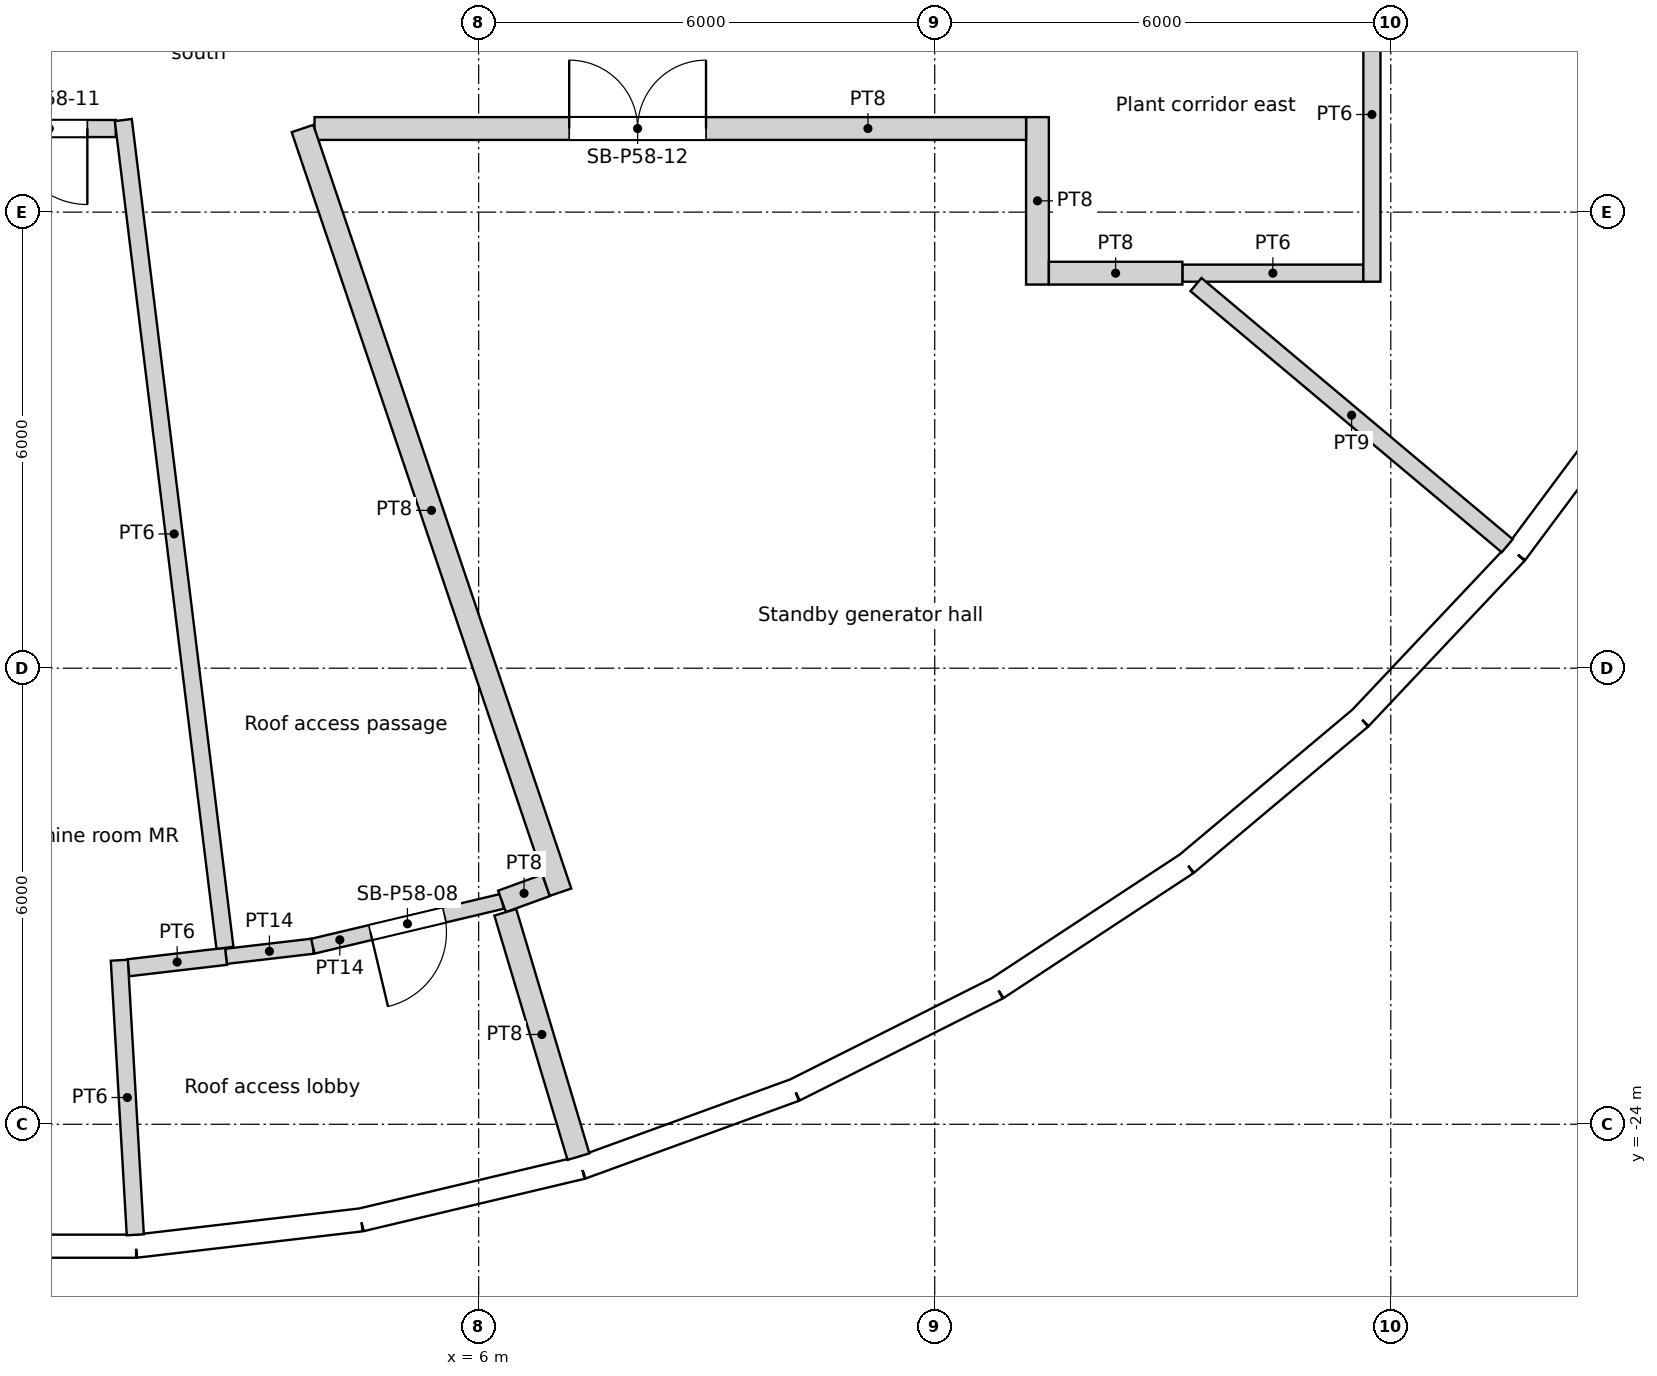
"""IFC4 building model, lengths in metres.
Left out: names, types, materials, properties, quantities, classifications, styles, units other than length and angle.
Written with IfcOpenShell. Run it as: python <this file> out.ifc"""

import sys

from ifc_helpers import new_model, si_unit, direction, frame, frame_2d, origin, origin_2d, place, context, subcontext, project, spatial, rectangle, circle, extrude, element, fill, save


model = new_model("IFC4")
c1 = context("Model", 3, precision=1e-05, world=origin(), true_north=direction((0.0, 1.0)))
c2 = subcontext(c1, "Body", "Model", "MODEL_VIEW")
j1 = project(units=[si_unit("LENGTHUNIT", "METRE"), si_unit("PLANEANGLEUNIT", "RADIAN")], contexts=[c1])
p1 = place(None, origin())
s1 = spatial("IfcSite", under=j1, at=p1, CompositionType="ELEMENT")
p2 = place(p1, origin())
s2 = spatial("IfcBuilding", under=s1, at=p2, CompositionType="ELEMENT")
p3 = place(p2, frame((0.0, 0.0, 225.0)))
s3 = spatial("IfcBuildingStorey", under=s2, at=p3, CompositionType="ELEMENT", Elevation=225.0)
for number, where, z_axis, x_axis in (
    (1, (4.263, -24.175, 0.0), (0.0, 0.0, 1.0), (1.0, 0.0, 0.0)),
    (2, (9.723, -22.54, 0.0), (0.0, 0.0, 1.0), (1.0, 0.0, 0.0)),
    (3, (14.659, -19.69, 0.0), (0.0, 0.0, 1.0), (1.0, 0.0, 0.0)),
    (4, (18.805, -15.779, 0.0), (0.0, 0.0, 1.0), (1.0, 0.0, 0.0)),
):
    element("IfcColumn", number, at=place(p3, frame(where, z_axis=z_axis, x_axis=x_axis)), inside=s3, PredefinedType="COLUMN", context=c2, shape_type="SweptSolid", body=[
        extrude(circle(Radius=0.6, at=origin_2d()), origin(), (0.0, 0.0, 1.0), 6.0),
    ])
for number, where, z_axis, x_axis in (
    (5, (1.406, -18.77, 0.0), (0.0, 0.0, 1.0), (1.0, 0.0, 0.0)),
    (6, (6.876, -17.521, 0.0), (0.0, 0.0, 1.0), (1.0, 0.0, 0.0)),
    (7, (11.735, -14.716, 0.0), (0.0, 0.0, 1.0), (1.0, 0.0, 0.0)),
    (8, (15.552, -10.603, 0.0), (0.0, 0.0, 1.0), (1.0, 0.0, 0.0)),
):
    element("IfcColumn", number, at=place(p3, frame(where, z_axis=z_axis, x_axis=x_axis)), inside=s3, PredefinedType="COLUMN", context=c2, shape_type="SweptSolid", body=[
        extrude(circle(Radius=0.65, at=origin_2d()), origin(), (0.0, 0.0, 1.0), 6.0),
    ])
p4 = place(p3, frame((-1.491, -25.604, 0.0), z_axis=(0.0, 0.0, 1.0), x_axis=(1.0, 0.0, 0.0)))
e9 = element("IfcWall", 9, at=p4, inside=s3, PredefinedType="SOLIDWALL", context=c2, shape_type="SweptSolid", body=[
    extrude(rectangle(XDim=2.982, YDim=0.3, at=frame_2d((1.491, 0.0))), origin(), (0.0, 0.0, 1.0), 5.65),
])
p5 = place(p4, frame((1.491, 0.0, 1.825)))
e10 = element("IfcOpeningElement", 10, at=p5, cuts=e9, PredefinedType="OPENING", context=c2, shape_type="SweptSolid", body=[
    extrude(circle(Radius=1.2, at=origin_2d()), frame((0.0, 0.16, 0.0), z_axis=(0.0, -1.0, 0.0), x_axis=(1.0, 0.0, 0.0)), (0.0, 0.0, 1.0), 0.32),
])
p6 = place(p3, frame((1.491, -25.604, 0.0), z_axis=(0.0, 0.0, 1.0), x_axis=(0.993240822844, 0.116071821888, 0.0)))
e11 = element("IfcWall", 11, at=p6, inside=s3, PredefinedType="SOLIDWALL", context=c2, shape_type="SweptSolid", body=[
    extrude(rectangle(XDim=2.983, YDim=0.3, at=frame_2d((1.491, 0.0))), origin(), (0.0, 0.0, 1.0), 5.65),
])
p7 = place(p6, frame((1.491, 0.0, 1.825)))
e12 = element("IfcOpeningElement", 12, at=p7, cuts=e11, PredefinedType="OPENING", context=c2, shape_type="SweptSolid", body=[
    extrude(circle(Radius=1.2, at=origin_2d()), frame((0.0, 0.16, 0.0), z_axis=(0.0, -1.0, 0.0), x_axis=(1.0, 0.0, 0.0)), (0.0, 0.0, 1.0), 0.32),
])
p8 = place(p3, frame((4.454, -25.258, 0.0), z_axis=(0.0, 0.0, 1.0), x_axis=(0.973049843813, 0.230594886012, 0.0)))
e13 = element("IfcWall", 13, at=p8, inside=s3, PredefinedType="SOLIDWALL", context=c2, shape_type="SweptSolid", body=[
    extrude(rectangle(XDim=2.982, YDim=0.3, at=frame_2d((1.491, 0.0))), origin(), (0.0, 0.0, 1.0), 5.65),
])
p9 = place(p8, frame((1.491, 0.0, 1.825)))
e14 = element("IfcOpeningElement", 14, at=p9, cuts=e13, PredefinedType="OPENING", context=c2, shape_type="SweptSolid", body=[
    extrude(circle(Radius=1.2, at=origin_2d()), frame((0.0, 0.16, 0.0), z_axis=(0.0, -1.0, 0.0), x_axis=(1.0, 0.0, 0.0)), (0.0, 0.0, 1.0), 0.32),
])
p10 = place(p3, frame((7.356, -24.57, 0.0), z_axis=(0.0, 0.0, 1.0), x_axis=(0.939676264274, 0.342065079129, 0.0)))
e15 = element("IfcWall", 15, at=p10, inside=s3, PredefinedType="SOLIDWALL", context=c2, shape_type="SweptSolid", body=[
    extrude(rectangle(XDim=2.983, YDim=0.3, at=frame_2d((1.491, 0.0))), origin(), (0.0, 0.0, 1.0), 5.65),
])
p11 = place(p10, frame((1.491, 0.0, 1.825)))
e16 = element("IfcOpeningElement", 16, at=p11, cuts=e15, PredefinedType="OPENING", context=c2, shape_type="SweptSolid", body=[
    extrude(circle(Radius=1.2, at=origin_2d()), frame((0.0, 0.16, 0.0), z_axis=(0.0, -1.0, 0.0), x_axis=(1.0, 0.0, 0.0)), (0.0, 0.0, 1.0), 0.32),
])
p12 = place(p3, frame((10.158, -23.55, 0.0), z_axis=(0.0, 0.0, 1.0), x_axis=(0.893656390984, 0.448751885626, 0.0)))
e17 = element("IfcWall", 17, at=p12, inside=s3, PredefinedType="SOLIDWALL", context=c2, shape_type="SweptSolid", body=[
    extrude(rectangle(XDim=2.982, YDim=0.3, at=frame_2d((1.491, 0.0))), origin(), (0.0, 0.0, 1.0), 5.65),
])
p13 = place(p12, frame((1.491, 0.0, 1.825)))
e18 = element("IfcOpeningElement", 18, at=p13, cuts=e17, PredefinedType="OPENING", context=c2, shape_type="SweptSolid", body=[
    extrude(circle(Radius=1.2, at=origin_2d()), frame((0.0, 0.16, 0.0), z_axis=(0.0, -1.0, 0.0), x_axis=(1.0, 0.0, 0.0)), (0.0, 0.0, 1.0), 0.32),
])
p14 = place(p3, frame((12.824, -22.211, 0.0), z_axis=(0.0, 0.0, 1.0), x_axis=(0.835497187922, 0.549494721517, 0.0)))
e19 = element("IfcWall", 19, at=p14, inside=s3, PredefinedType="SOLIDWALL", context=c2, shape_type="SweptSolid", body=[
    extrude(rectangle(XDim=2.983, YDim=0.3, at=frame_2d((1.491, 0.0))), origin(), (0.0, 0.0, 1.0), 5.65),
])
p15 = place(p14, frame((1.491, 0.0, 1.825)))
e20 = element("IfcOpeningElement", 20, at=p15, cuts=e19, PredefinedType="OPENING", context=c2, shape_type="SweptSolid", body=[
    extrude(circle(Radius=1.2, at=origin_2d()), frame((0.0, 0.16, 0.0), z_axis=(0.0, -1.0, 0.0), x_axis=(1.0, 0.0, 0.0)), (0.0, 0.0, 1.0), 0.32),
])
p16 = place(p3, frame((15.316, -20.573, 0.0), z_axis=(0.0, 0.0, 1.0), x_axis=(0.766015999952, 0.64282150541, 0.0)))
e21 = element("IfcWall", 21, at=p16, inside=s3, PredefinedType="SOLIDWALL", context=c2, shape_type="SweptSolid", body=[
    extrude(rectangle(XDim=2.982, YDim=0.3, at=frame_2d((1.491, 0.0))), origin(), (0.0, 0.0, 1.0), 5.65),
])
p17 = place(p16, frame((1.491, 0.0, 1.825)))
e22 = element("IfcOpeningElement", 22, at=p17, cuts=e21, PredefinedType="OPENING", context=c2, shape_type="SweptSolid", body=[
    extrude(circle(Radius=1.2, at=origin_2d()), frame((0.0, 0.16, 0.0), z_axis=(0.0, -1.0, 0.0), x_axis=(1.0, 0.0, 0.0)), (0.0, 0.0, 1.0), 0.32),
])
p18 = place(p3, frame((17.6, -18.655, 0.0), z_axis=(0.0, 0.0, 1.0), x_axis=(0.686219609698, 0.72739442345, 0.0)))
e23 = element("IfcWall", 23, at=p18, inside=s3, PredefinedType="SOLIDWALL", context=c2, shape_type="SweptSolid", body=[
    extrude(rectangle(XDim=2.982, YDim=0.3, at=frame_2d((1.491, 0.0))), origin(), (0.0, 0.0, 1.0), 5.65),
])
p19 = place(p18, frame((1.491, 0.0, 1.825)))
e24 = element("IfcOpeningElement", 24, at=p19, cuts=e23, PredefinedType="OPENING", context=c2, shape_type="SweptSolid", body=[
    extrude(circle(Radius=1.2, at=origin_2d()), frame((0.0, 0.16, 0.0), z_axis=(0.0, -1.0, 0.0), x_axis=(1.0, 0.0, 0.0)), (0.0, 0.0, 1.0), 0.32),
])
p20 = place(p3, frame((19.647, -16.486, 0.0), z_axis=(0.0, 0.0, 1.0), x_axis=(0.597206768034, 0.802087324557, 0.0)))
e25 = element("IfcWall", 25, at=p20, inside=s3, PredefinedType="SOLIDWALL", context=c2, shape_type="SweptSolid", body=[
    extrude(rectangle(XDim=2.983, YDim=0.3, at=frame_2d((1.491, 0.0))), origin(), (0.0, 0.0, 1.0), 5.65),
])
p21 = place(p20, frame((1.491, 0.0, 1.825)))
e26 = element("IfcOpeningElement", 26, at=p21, cuts=e25, PredefinedType="OPENING", context=c2, shape_type="SweptSolid", body=[
    extrude(circle(Radius=1.2, at=origin_2d()), frame((0.0, 0.16, 0.0), z_axis=(0.0, -1.0, 0.0), x_axis=(1.0, 0.0, 0.0)), (0.0, 0.0, 1.0), 0.32),
])
p22 = place(p3, frame((-0.635, -10.9, 0.0), z_axis=(0.0, 0.0, 1.0), x_axis=(1.0, 0.0, 0.0)))
e27 = element("IfcWall", 27, at=p22, inside=s3, PredefinedType="PARTITIONING", context=c2, shape_type="SweptSolid", body=[
    extrude(rectangle(XDim=1.861, YDim=0.225, at=frame_2d((0.93, 0.0))), origin(), (0.0, 0.0, 1.0), 5.2),
])
p23 = place(p22, frame((0.487, 0.0, 0.0)))
e28 = element("IfcOpeningElement", 28, at=p23, cuts=e27, PredefinedType="OPENING", context=c2, shape_type="SweptSolid", body=[
    extrude(rectangle(XDim=1.0, YDim=2.1, at=frame_2d((0.5, 1.05))), frame((0.0, 0.113, 0.0), z_axis=(0.0, -1.0, 0.0), x_axis=(1.0, 0.0, 0.0)), (0.0, 0.0, 1.0), 0.225),
])
p24 = place(p3, frame((1.39, -21.941, 0.0), z_axis=(0.0, 0.0, 1.0), x_axis=(0.993246843988, 0.11602028662, 0.0)))
e29 = element("IfcWall", 29, at=p24, inside=s3, PredefinedType="PARTITIONING", context=c2, shape_type="SweptSolid", body=[
    extrude(rectangle(XDim=1.294, YDim=0.225, at=frame_2d((0.647, 0.0))), origin(), (0.0, 0.0, 1.0), 5.2),
])
p25 = place(p3, frame((1.482, -25.454, 0.0), z_axis=(0.0, 0.0, 1.0), x_axis=(-0.058093127589, 0.998311168187, 0.0)))
e30 = element("IfcWall", 30, at=p25, inside=s3, PredefinedType="PARTITIONING", context=c2, shape_type="SweptSolid", body=[
    extrude(rectangle(XDim=3.618, YDim=0.225, at=frame_2d((1.809, 0.0))), origin(), (0.0, 0.0, 1.0), 5.2),
])
p26 = place(p3, frame((2.662, -21.679, 0.0), z_axis=(0.0, 0.0, 1.0), x_axis=(-0.121884764191, 0.992544258085, 0.0)))
e31 = element("IfcWall", 31, at=p26, inside=s3, PredefinedType="PARTITIONING", context=c2, shape_type="SweptSolid", body=[
    extrude(rectangle(XDim=10.973, YDim=0.225, at=frame_2d((5.486, 0.0))), origin(), (0.0, 0.0, 1.0), 5.2),
])
p27 = place(p3, frame((2.676, -21.791, 0.0), z_axis=(0.0, 0.0, 1.0), x_axis=(0.99324154859, 0.116065611425, 0.0)))
e32 = element("IfcWall", 32, at=p27, inside=s3, PredefinedType="PARTITIONING", context=c2, shape_type="SweptSolid", body=[
    extrude(rectangle(XDim=1.151, YDim=0.2, at=frame_2d((0.575, 0.0))), origin(), (0.0, 0.0, 1.0), 5.2),
])
p28 = place(p3, frame((3.84, -10.9, 0.0), z_axis=(0.0, 0.0, 1.0), x_axis=(1.0, 0.0, 0.0)))
e33 = element("IfcWall", 33, at=p28, inside=s3, PredefinedType="PARTITIONING", context=c2, shape_type="SweptSolid", body=[
    extrude(rectangle(XDim=9.361, YDim=0.3, at=frame_2d((4.681, 0.0))), origin(), (0.0, 0.0, 1.0), 5.2),
])
p29 = place(p28, frame((3.351, 0.0, 0.0)))
e34 = element("IfcOpeningElement", 34, at=p29, cuts=e33, PredefinedType="OPENING", context=c2, shape_type="SweptSolid", body=[
    extrude(rectangle(XDim=1.8, YDim=2.4, at=frame_2d((0.9, 1.2))), frame((0.0, 0.15, 0.0), z_axis=(0.0, -1.0, 0.0), x_axis=(1.0, 0.0, 0.0)), (0.0, 0.0, 1.0), 0.3),
])
p30 = place(p3, frame((6.307, -21.067, 0.0), z_axis=(0.0, 0.0, 1.0), x_axis=(-0.973040272851, -0.230635269225, 0.0)))
e35 = element("IfcWall", 35, at=p30, inside=s3, PredefinedType="PARTITIONING", context=c2, shape_type="SweptSolid", body=[
    extrude(rectangle(XDim=2.557, YDim=0.2, at=frame_2d((1.279, 0.0))), origin(), (0.0, 0.0, 1.0), 5.2),
])
p31 = place(p30, frame((0.779, 0.0, 0.0)))
e36 = element("IfcOpeningElement", 36, at=p31, cuts=e35, PredefinedType="OPENING", context=c2, shape_type="SweptSolid", body=[
    extrude(rectangle(XDim=1.0, YDim=2.1, at=frame_2d((0.5, 1.05))), frame((0.0, 0.1, 0.0), z_axis=(0.0, -1.0, 0.0), x_axis=(1.0, 0.0, 0.0)), (0.0, 0.0, 1.0), 0.2),
])
p32 = place(p3, frame((6.307, -21.067, 0.0), z_axis=(0.0, 0.0, 1.0), x_axis=(0.93966634231, 0.342092334216, 0.0)))
e37 = element("IfcWall", 37, at=p32, inside=s3, PredefinedType="PARTITIONING", context=c2, shape_type="SweptSolid", body=[
    extrude(rectangle(XDim=0.617, YDim=0.3, at=frame_2d((0.309, 0.0))), origin(), (0.0, 0.0, 1.0), 5.2),
])
p33 = place(p3, frame((7.076, -20.947, 0.0), z_axis=(0.0, 0.0, 1.0), x_axis=(-0.320044465118, 0.947402522874, 0.0)))
e38 = element("IfcWall", 38, at=p33, inside=s3, PredefinedType="PARTITIONING", context=c2, shape_type="SweptSolid", body=[
    extrude(rectangle(XDim=10.605, YDim=0.3, at=frame_2d((5.302, 0.0))), origin(), (0.0, 0.0, 1.0), 5.2),
])
p34 = place(p3, frame((7.313, -24.426, 0.0), z_axis=(0.0, 0.0, 1.0), x_axis=(-0.286787181077, 0.957994317713, 0.0)))
e39 = element("IfcWall", 39, at=p34, inside=s3, PredefinedType="PARTITIONING", context=c2, shape_type="SweptSolid", body=[
    extrude(rectangle(XDim=3.356, YDim=0.3, at=frame_2d((1.678, 0.0))), origin(), (0.0, 0.0, 1.0), 5.2),
])
p35 = place(p3, frame((13.502, -12.803, 0.0), z_axis=(0.0, 0.0, 1.0), x_axis=(1.0, 0.0, 0.0)))
e40 = element("IfcWall", 40, at=p35, inside=s3, PredefinedType="PARTITIONING", context=c2, shape_type="SweptSolid", body=[
    extrude(rectangle(XDim=1.756, YDim=0.3, at=frame_2d((0.878, 0.0))), origin(), (0.0, 0.0, 1.0), 5.2),
])
p36 = place(p3, frame((13.352, -10.75, 0.0), z_axis=(0.0, 0.0, 1.0), x_axis=(0.0, -1.0, 0.0)))
e41 = element("IfcWall", 41, at=p36, inside=s3, PredefinedType="PARTITIONING", context=c2, shape_type="SweptSolid", body=[
    extrude(rectangle(XDim=2.203, YDim=0.3, at=frame_2d((1.102, 0.0))), origin(), (0.0, 0.0, 1.0), 5.2),
])
p37 = place(p3, frame((15.258, -12.803, 0.0), z_axis=(0.0, 0.0, 1.0), x_axis=(1.0, 0.0, 0.0)))
e42 = element("IfcWall", 42, at=p37, inside=s3, PredefinedType="PARTITIONING", context=c2, shape_type="SweptSolid", body=[
    extrude(rectangle(XDim=2.381, YDim=0.225, at=frame_2d((1.191, 0.0))), origin(), (0.0, 0.0, 1.0), 5.2),
])
p38 = place(p3, frame((17.752, -12.915, 0.0), z_axis=(0.0, 0.0, 1.0), x_axis=(0.0, 1.0, 0.0)))
e43 = element("IfcWall", 43, at=p38, inside=s3, PredefinedType="PARTITIONING", context=c2, shape_type="SweptSolid", body=[
    extrude(rectangle(XDim=4.4, YDim=0.225, at=frame_2d((2.2, 0.0))), origin(), (0.0, 0.0, 1.0), 5.2),
])
p39 = place(p3, frame((19.532, -16.389, 0.0), z_axis=(0.0, 0.0, 1.0), x_axis=(-0.766023242491, 0.642812874765, 0.0)))
e44 = element("IfcWall", 44, at=p39, inside=s3, PredefinedType="PARTITIONING", context=c2, shape_type="SweptSolid", body=[
    extrude(rectangle(XDim=5.346, YDim=0.225, at=frame_2d((2.673, 0.0))), origin(), (0.0, 0.0, 1.0), 2.7),
])
p40 = place(p5, origin())
e45 = element("IfcWindow", 45, at=p40, inside=s3, PartitioningType="SINGLE_PANEL", PredefinedType="WINDOW", context=c2, shape_type="SweptSolid", body=[
    extrude(circle(Radius=1.2, at=origin_2d()), frame((0.0, 0.12, 0.0), z_axis=(0.0, -1.0, 0.0), x_axis=(1.0, 0.0, 0.0)), (0.0, 0.0, 1.0), 0.1),
])
fill(e10, e45)
p41 = place(p7, origin())
e46 = element("IfcWindow", 46, at=p41, inside=s3, PartitioningType="SINGLE_PANEL", PredefinedType="WINDOW", context=c2, shape_type="SweptSolid", body=[
    extrude(circle(Radius=1.2, at=origin_2d()), frame((0.0, 0.12, 0.0), z_axis=(0.0, -1.0, 0.0), x_axis=(1.0, 0.0, 0.0)), (0.0, 0.0, 1.0), 0.1),
])
fill(e12, e46)
p42 = place(p9, origin())
e47 = element("IfcWindow", 47, at=p42, inside=s3, PartitioningType="SINGLE_PANEL", PredefinedType="WINDOW", context=c2, shape_type="SweptSolid", body=[
    extrude(circle(Radius=1.2, at=origin_2d()), frame((0.0, 0.12, 0.0), z_axis=(0.0, -1.0, 0.0), x_axis=(1.0, 0.0, 0.0)), (0.0, 0.0, 1.0), 0.1),
])
fill(e14, e47)
p43 = place(p11, origin())
e48 = element("IfcWindow", 48, at=p43, inside=s3, PartitioningType="SINGLE_PANEL", PredefinedType="WINDOW", context=c2, shape_type="SweptSolid", body=[
    extrude(circle(Radius=1.2, at=origin_2d()), frame((0.0, 0.12, 0.0), z_axis=(0.0, -1.0, 0.0), x_axis=(1.0, 0.0, 0.0)), (0.0, 0.0, 1.0), 0.1),
])
fill(e16, e48)
p44 = place(p13, origin())
e49 = element("IfcWindow", 49, at=p44, inside=s3, PartitioningType="SINGLE_PANEL", PredefinedType="WINDOW", context=c2, shape_type="SweptSolid", body=[
    extrude(circle(Radius=1.2, at=origin_2d()), frame((0.0, 0.12, 0.0), z_axis=(0.0, -1.0, 0.0), x_axis=(1.0, 0.0, 0.0)), (0.0, 0.0, 1.0), 0.1),
])
fill(e18, e49)
p45 = place(p15, origin())
e50 = element("IfcWindow", 50, at=p45, inside=s3, PartitioningType="SINGLE_PANEL", PredefinedType="WINDOW", context=c2, shape_type="SweptSolid", body=[
    extrude(circle(Radius=1.2, at=origin_2d()), frame((0.0, 0.12, 0.0), z_axis=(0.0, -1.0, 0.0), x_axis=(1.0, 0.0, 0.0)), (0.0, 0.0, 1.0), 0.1),
])
fill(e20, e50)
p46 = place(p17, origin())
e51 = element("IfcWindow", 51, at=p46, inside=s3, PartitioningType="SINGLE_PANEL", PredefinedType="WINDOW", context=c2, shape_type="SweptSolid", body=[
    extrude(circle(Radius=1.2, at=origin_2d()), frame((0.0, 0.12, 0.0), z_axis=(0.0, -1.0, 0.0), x_axis=(1.0, 0.0, 0.0)), (0.0, 0.0, 1.0), 0.1),
])
fill(e22, e51)
p47 = place(p19, origin())
e52 = element("IfcWindow", 52, at=p47, inside=s3, PartitioningType="SINGLE_PANEL", PredefinedType="WINDOW", context=c2, shape_type="SweptSolid", body=[
    extrude(circle(Radius=1.2, at=origin_2d()), frame((0.0, 0.12, 0.0), z_axis=(0.0, -1.0, 0.0), x_axis=(1.0, 0.0, 0.0)), (0.0, 0.0, 1.0), 0.1),
])
fill(e24, e52)
p48 = place(p21, origin())
e53 = element("IfcWindow", 53, at=p48, inside=s3, PartitioningType="SINGLE_PANEL", PredefinedType="WINDOW", context=c2, shape_type="SweptSolid", body=[
    extrude(circle(Radius=1.2, at=origin_2d()), frame((0.0, 0.12, 0.0), z_axis=(0.0, -1.0, 0.0), x_axis=(1.0, 0.0, 0.0)), (0.0, 0.0, 1.0), 0.1),
])
fill(e26, e53)
p49 = place(p31, origin())
e54 = element("IfcDoor", 54, at=p49, inside=s3, OperationType="SINGLE_SWING_RIGHT", PredefinedType="DOOR", context=c2, shape_type="SweptSolid", body=[
    extrude(rectangle(XDim=1.0, YDim=2.1, at=frame_2d((0.5, 1.05))), frame((0.0, 0.025, 0.0), z_axis=(0.0, -1.0, 0.0), x_axis=(1.0, 0.0, 0.0)), (0.0, 0.0, 1.0), 0.05),
])
fill(e36, e54)
p50 = place(p23, origin())
e55 = element("IfcDoor", 55, at=p50, inside=s3, OperationType="SINGLE_SWING_LEFT", PredefinedType="DOOR", context=c2, shape_type="SweptSolid", body=[
    extrude(rectangle(XDim=1.0, YDim=2.1, at=frame_2d((0.5, 1.05))), frame((0.0, 0.025, 0.0), z_axis=(0.0, -1.0, 0.0), x_axis=(1.0, 0.0, 0.0)), (0.0, 0.0, 1.0), 0.05),
])
fill(e28, e55)
p51 = place(p29, origin())
e56 = element("IfcDoor", 56, at=p51, inside=s3, OperationType="DOUBLE_DOOR_SINGLE_SWING", PredefinedType="DOOR", context=c2, shape_type="SweptSolid", body=[
    extrude(rectangle(XDim=1.8, YDim=2.4, at=frame_2d((0.9, 1.2))), frame((0.0, 0.025, 0.0), z_axis=(0.0, -1.0, 0.0), x_axis=(1.0, 0.0, 0.0)), (0.0, 0.0, 1.0), 0.05),
])
fill(e34, e56)
save(model, sys.argv[1])
